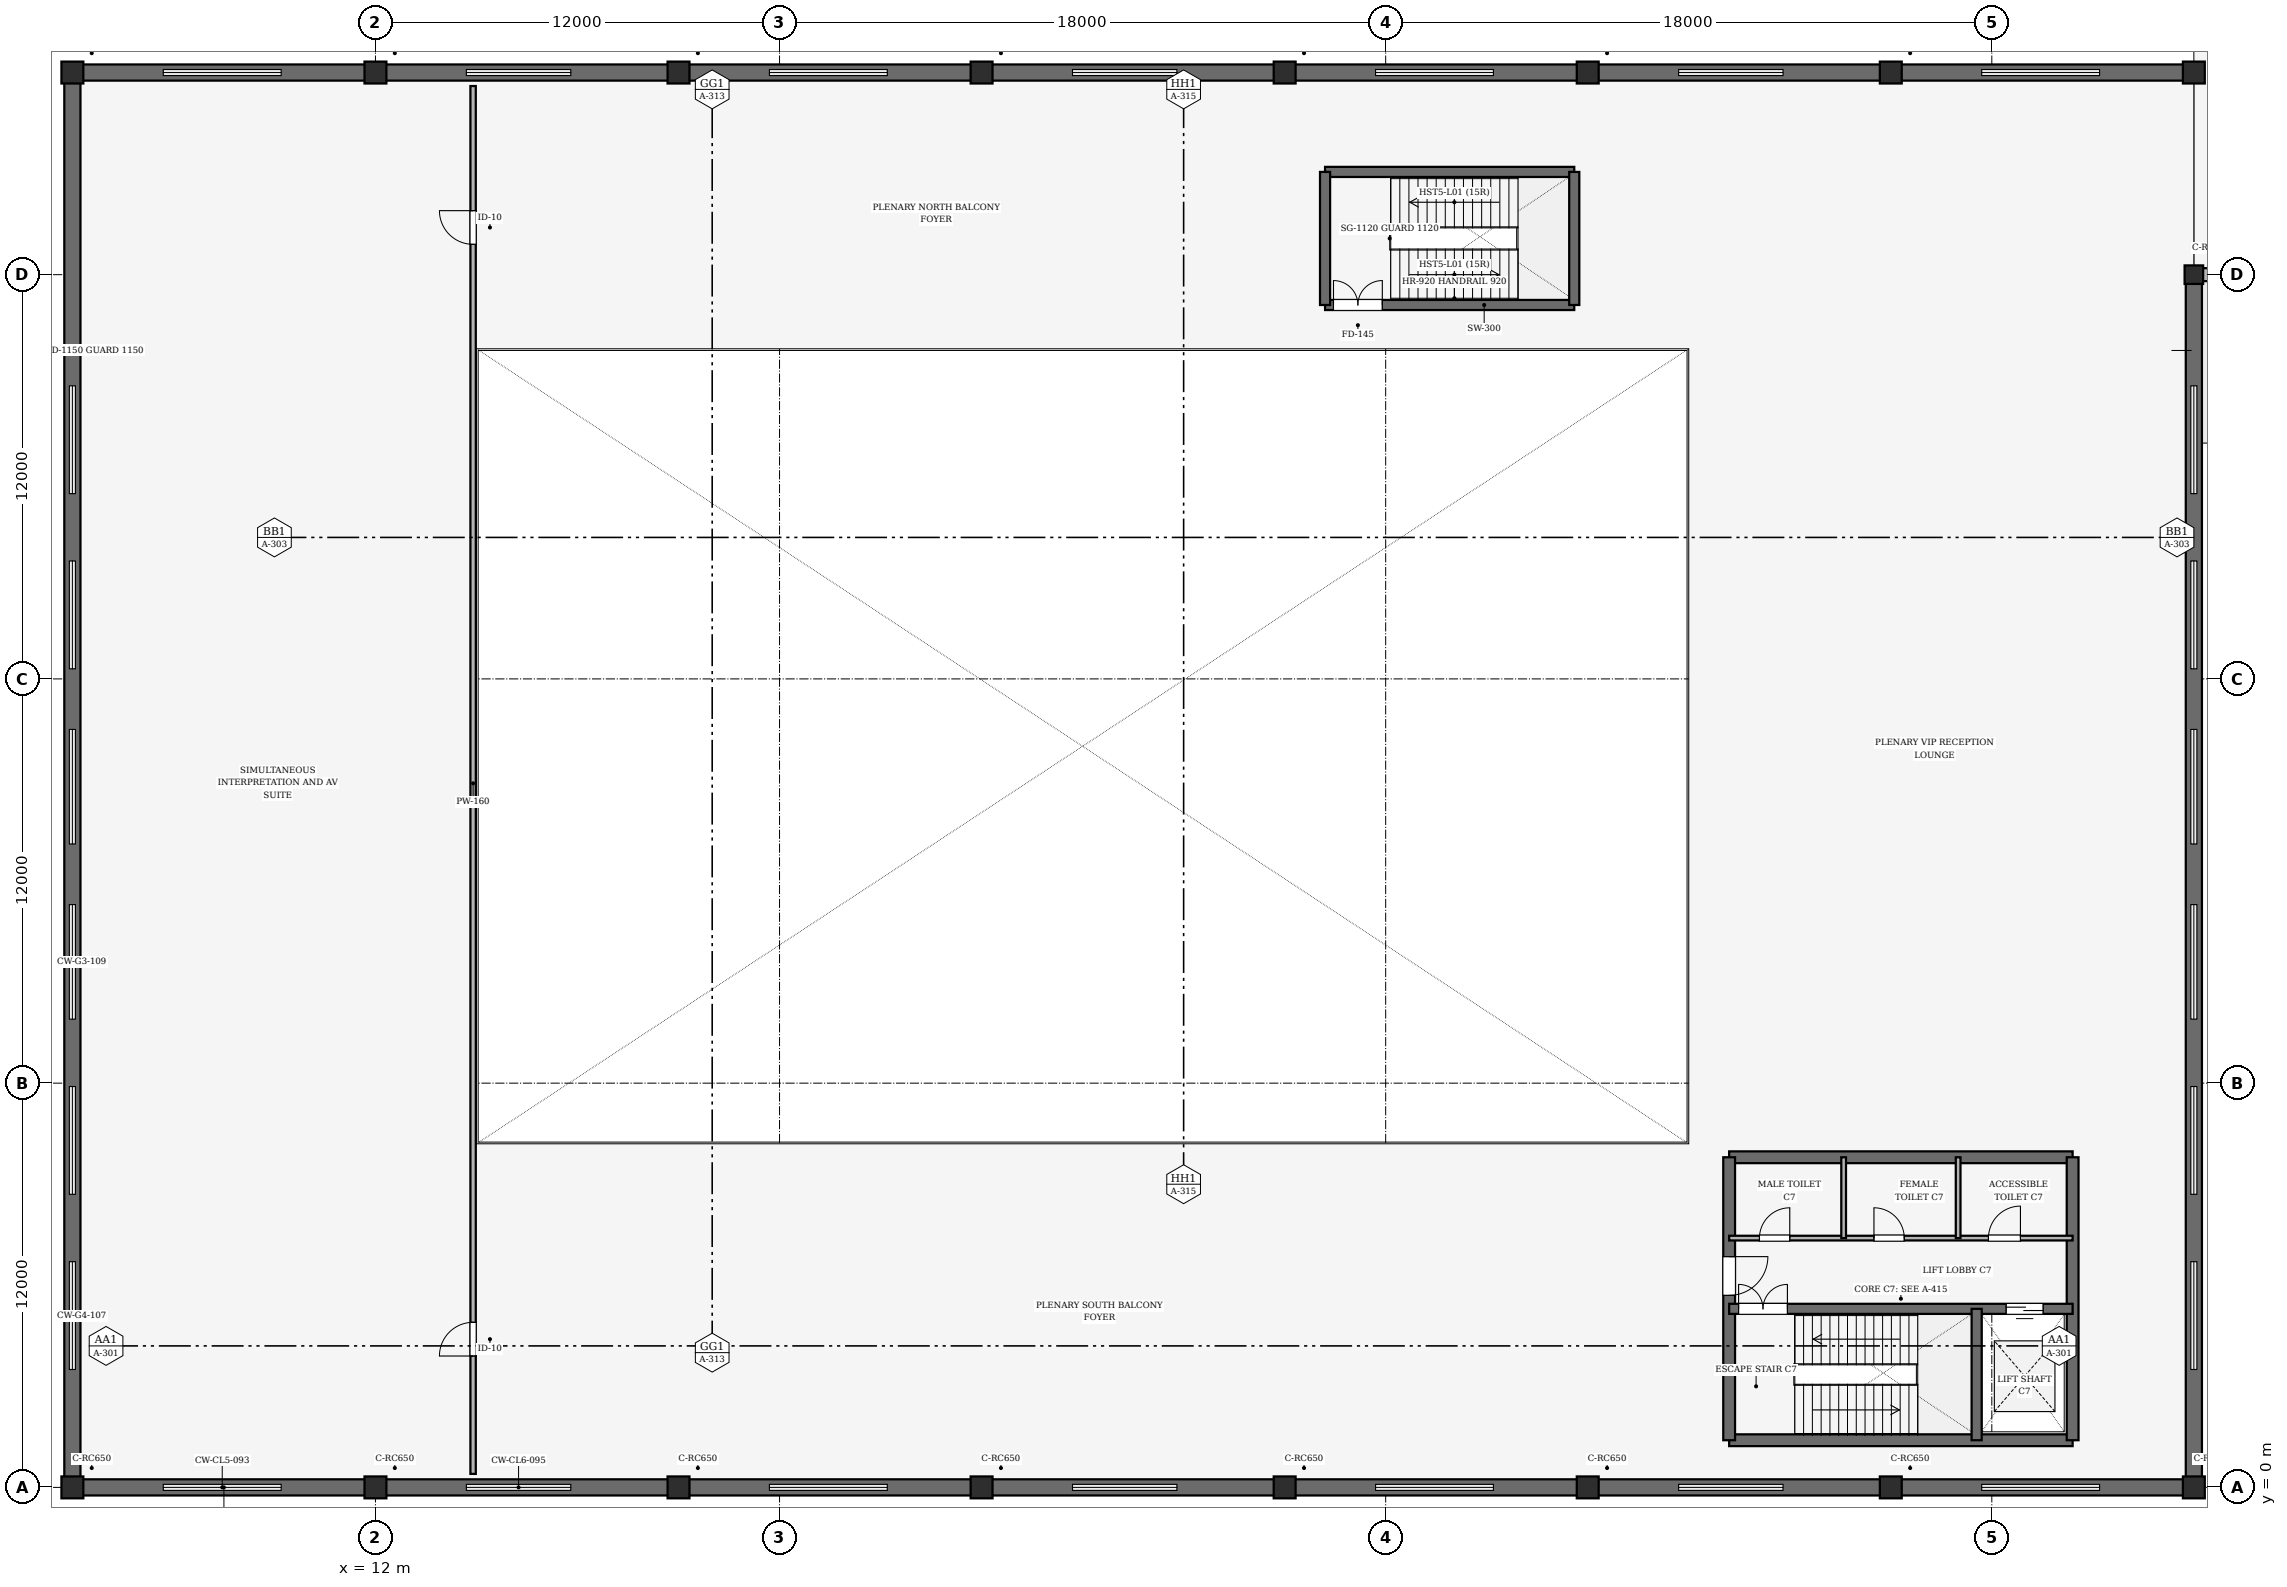
"""IFC4 building model, lengths in metres.
Left out: names, types, materials, properties, quantities, classifications, styles, units other than length and angle.
Written with IfcOpenShell. Run it as: python <this file> out.ifc"""

import sys

from ifc_helpers import new_model, si_unit, direction, frame, frame_2d, origin, origin_2d, place, context, subcontext, project, spatial, rectangle, extrude, element, fill, save


model = new_model("IFC4")
c1 = context("Model", 3, precision=1e-05, world=origin(), true_north=direction((0.0, 1.0)))
c2 = subcontext(c1, "Body", "Model", "MODEL_VIEW")
j1 = project(units=[si_unit("LENGTHUNIT", "METRE"), si_unit("PLANEANGLEUNIT", "RADIAN")], contexts=[c1])
p1 = place(None, origin())
s1 = spatial("IfcSite", under=j1, at=p1, CompositionType="ELEMENT")
p2 = place(p1, origin())
s2 = spatial("IfcBuilding", under=s1, at=p2, CompositionType="ELEMENT")
p3 = place(p2, frame((0.0, 0.0, 5.4)))
s3 = spatial("IfcBuildingStorey", under=s2, at=p3, CompositionType="ELEMENT", Elevation=5.4)
for number, where, z_axis, x_axis in (
    (1, (3.0, 0.0, 0.0), (0.0, 0.0, 1.0), (1.0, 0.0, 0.0)),
    (2, (3.0, 42.0, 0.0), (0.0, 0.0, 1.0), (1.0, 0.0, 0.0)),
    (3, (12.0, 0.0, 0.0), (0.0, 0.0, 1.0), (1.0, 0.0, 0.0)),
    (4, (12.0, 42.0, 0.0), (0.0, 0.0, 1.0), (1.0, 0.0, 0.0)),
    (5, (21.0, 0.0, 0.0), (0.0, 0.0, 1.0), (1.0, 0.0, 0.0)),
    (6, (21.0, 42.0, 0.0), (0.0, 0.0, 1.0), (1.0, 0.0, 0.0)),
    (7, (30.0, 0.0, 0.0), (0.0, 0.0, 1.0), (1.0, 0.0, 0.0)),
    (8, (30.0, 42.0, 0.0), (0.0, 0.0, 1.0), (1.0, 0.0, 0.0)),
):
    element("IfcColumn", number, at=place(p3, frame(where, z_axis=z_axis, x_axis=x_axis)), inside=s3, PredefinedType="COLUMN", context=c2, shape_type="SweptSolid", body=[
        extrude(rectangle(XDim=0.65, YDim=0.65, at=origin_2d()), origin(), (0.0, 0.0, 1.0), 6.3),
    ])
for number, where, z_axis, x_axis in (
    (9, (39.0, 0.0, 0.0), (0.0, 0.0, 1.0), (1.0, 0.0, 0.0)),
    (10, (39.0, 42.0, 0.0), (0.0, 0.0, 1.0), (1.0, 0.0, 0.0)),
    (11, (48.0, 0.0, 0.0), (0.0, 0.0, 1.0), (1.0, 0.0, 0.0)),
    (12, (48.0, 42.0, 0.0), (0.0, 0.0, 1.0), (1.0, 0.0, 0.0)),
    (13, (57.0, 0.0, 0.0), (0.0, 0.0, 1.0), (1.0, 0.0, 0.0)),
    (14, (57.0, 42.0, 0.0), (0.0, 0.0, 1.0), (1.0, 0.0, 0.0)),
    (15, (66.0, 0.0, 0.0), (0.0, 0.0, 1.0), (1.0, 0.0, 0.0)),
    (16, (66.0, 42.0, 0.0), (0.0, 0.0, 1.0), (1.0, 0.0, 0.0)),
):
    element("IfcColumn", number, at=place(p3, frame(where, z_axis=z_axis, x_axis=x_axis)), inside=s3, PredefinedType="COLUMN", context=c2, shape_type="SweptSolid", body=[
        extrude(rectangle(XDim=0.65, YDim=0.65, at=origin_2d()), origin(), (0.0, 0.0, 1.0), 5.4),
    ])
p4 = place(p3, frame((66.0, 36.0, 0.0), z_axis=(0.0, 0.0, 1.0), x_axis=(1.0, 0.0, 0.0)))
e17 = element("IfcColumn", 17, at=p4, inside=s3, PredefinedType="COLUMN", context=c2, shape_type="SweptSolid", body=[
    extrude(rectangle(XDim=0.55, YDim=0.55, at=origin_2d()), origin(), (0.0, 0.0, 1.0), 5.4),
])
for number, where, z_axis, x_axis in (
    (18, (3.0, 0.0, 0.0), (0.0, 0.0, 1.0), (1.0, 0.0, 0.0)),
    (19, (12.0, 42.0, 0.0), (0.0, 0.0, 1.0), (-1.0, 0.0, 0.0)),
    (20, (12.0, 0.0, 0.0), (0.0, 0.0, 1.0), (1.0, 0.0, 0.0)),
    (21, (21.0, 42.0, 0.0), (0.0, 0.0, 1.0), (-1.0, 0.0, 0.0)),
    (22, (21.0, 0.0, 0.0), (0.0, 0.0, 1.0), (1.0, 0.0, 0.0)),
    (23, (30.0, 42.0, 0.0), (0.0, 0.0, 1.0), (-1.0, 0.0, 0.0)),
    (24, (30.0, 0.0, 0.0), (0.0, 0.0, 1.0), (1.0, 0.0, 0.0)),
    (25, (39.0, 42.0, 0.0), (0.0, 0.0, 1.0), (-1.0, 0.0, 0.0)),
    (26, (39.0, 0.0, 0.0), (0.0, 0.0, 1.0), (1.0, 0.0, 0.0)),
    (27, (48.0, 42.0, 0.0), (0.0, 0.0, 1.0), (-1.0, 0.0, 0.0)),
    (28, (48.0, 0.0, 0.0), (0.0, 0.0, 1.0), (1.0, 0.0, 0.0)),
    (29, (57.0, 42.0, 0.0), (0.0, 0.0, 1.0), (-1.0, 0.0, 0.0)),
    (30, (57.0, 0.0, 0.0), (0.0, 0.0, 1.0), (1.0, 0.0, 0.0)),
    (31, (66.0, 42.0, 0.0), (0.0, 0.0, 1.0), (-1.0, 0.0, 0.0)),
):
    element("IfcWall", number, at=place(p3, frame(where, z_axis=z_axis, x_axis=x_axis)), inside=s3, PredefinedType="SOLIDWALL", context=c2, shape_type="SweptSolid", body=[
        extrude(rectangle(XDim=9.0, YDim=0.48, at=frame_2d((4.5, 0.0))), origin(), (0.0, 0.0, 1.0), 1.85),
    ])
p5 = place(p3, frame((3.0, 42.0, 0.0), z_axis=(0.0, 0.0, 1.0), x_axis=(0.0, -1.0, 0.0)))
e32 = element("IfcWall", 32, at=p5, inside=s3, PredefinedType="SOLIDWALL", context=c2, shape_type="SweptSolid", body=[
    extrude(rectangle(XDim=42.0, YDim=0.48, at=frame_2d((21.0, 0.0))), origin(), (0.0, 0.0, 1.0), 0.95),
])
p6 = place(p3, frame((66.0, 0.0, 0.0), z_axis=(0.0, 0.0, 1.0), x_axis=(0.0, 1.0, 0.0)))
e33 = element("IfcWall", 33, at=p6, inside=s3, PredefinedType="SOLIDWALL", context=c2, shape_type="SweptSolid", body=[
    extrude(rectangle(XDim=36.0, YDim=0.48, at=frame_2d((18.0, 0.0))), origin(), (0.0, 0.0, 1.0), 0.95),
])
p7 = place(p3, frame((66.0, 36.0, 0.0), z_axis=(0.0, 0.0, 1.0), x_axis=(1.0, 0.0, 0.0)))
e34 = element("IfcWall", 34, at=p7, inside=s3, PredefinedType="SOLIDWALL", context=c2, shape_type="SweptSolid", body=[
    extrude(rectangle(XDim=18.0, YDim=0.385, at=frame_2d((9.0, 0.0))), origin(), (0.0, 0.0, 1.0), 0.6),
])
for number, where, z_axis, x_axis in (
    (35, (52.2, 1.4, 0.0), (0.0, 0.0, 1.0), (1.0, 0.0, 0.0)),
    (36, (62.4, 9.8, 0.0), (0.0, 0.0, 1.0), (-1.0, 0.0, 0.0)),
):
    element("IfcWall", number, at=place(p3, frame(where, z_axis=z_axis, x_axis=x_axis)), inside=s3, PredefinedType="SHEAR", context=c2, shape_type="SweptSolid", body=[
        extrude(rectangle(XDim=10.2, YDim=0.35, at=frame_2d((5.1, 0.0))), origin(), (0.0, 0.0, 1.0), 5.4),
    ])
p8 = place(p3, frame((52.2, 9.8, 0.0), z_axis=(0.0, 0.0, 1.0), x_axis=(0.0, -1.0, 0.0)))
e37 = element("IfcWall", 37, at=p8, inside=s3, PredefinedType="SHEAR", context=c2, shape_type="SweptSolid", body=[
    extrude(rectangle(XDim=8.4, YDim=0.35, at=frame_2d((4.2, 0.0))), origin(), (0.0, 0.0, 1.0), 5.4),
])
p9 = place(p8, frame((2.95, 0.0, 0.0)))
e38 = element("IfcOpeningElement", 38, at=p9, cuts=e37, PredefinedType="OPENING", context=c2, shape_type="SweptSolid", body=[
    extrude(rectangle(XDim=1.15, YDim=2.15, at=frame_2d((0.575, 1.075))), frame((0.0, 0.185, 0.0), z_axis=(0.0, -1.0, 0.0), x_axis=(1.0, 0.0, 0.0)), (0.0, 0.0, 1.0), 0.37),
])
p10 = place(p3, frame((62.4, 1.4, 0.0), z_axis=(0.0, 0.0, 1.0), x_axis=(0.0, 1.0, 0.0)))
e39 = element("IfcWall", 39, at=p10, inside=s3, PredefinedType="SHEAR", context=c2, shape_type="SweptSolid", body=[
    extrude(rectangle(XDim=8.4, YDim=0.35, at=frame_2d((4.2, 0.0))), origin(), (0.0, 0.0, 1.0), 5.4),
])
p11 = place(p3, frame((52.2, 5.3, 0.0), z_axis=(0.0, 0.0, 1.0), x_axis=(1.0, 0.0, 0.0)))
e40 = element("IfcWall", 40, at=p11, inside=s3, PredefinedType="SHEAR", context=c2, shape_type="SweptSolid", body=[
    extrude(rectangle(XDim=10.2, YDim=0.3, at=frame_2d((5.1, 0.0))), origin(), (0.0, 0.0, 1.0), 5.4),
])
p12 = place(p11, frame((0.28, 0.0, 0.0)))
e41 = element("IfcOpeningElement", 41, at=p12, cuts=e40, PredefinedType="OPENING", context=c2, shape_type="SweptSolid", body=[
    extrude(rectangle(XDim=1.45, YDim=2.15, at=frame_2d((0.725, 1.075))), frame((0.0, 0.16, 0.0), z_axis=(0.0, -1.0, 0.0), x_axis=(1.0, 0.0, 0.0)), (0.0, 0.0, 1.0), 0.32),
])
p13 = place(p11, frame((8.225, 0.0, 0.0)))
e42 = element("IfcOpeningElement", 42, at=p13, cuts=e40, PredefinedType="OPENING", context=c2, shape_type="SweptSolid", body=[
    extrude(rectangle(XDim=1.1, YDim=2.15, at=frame_2d((0.55, 1.075))), frame((0.0, 0.16, 0.0), z_axis=(0.0, -1.0, 0.0), x_axis=(1.0, 0.0, 0.0)), (0.0, 0.0, 1.0), 0.32),
])
p14 = place(p3, frame((59.55, 1.4, 0.0), z_axis=(0.0, 0.0, 1.0), x_axis=(0.0, 1.0, 0.0)))
e43 = element("IfcWall", 43, at=p14, inside=s3, PredefinedType="SHEAR", context=c2, shape_type="SweptSolid", body=[
    extrude(rectangle(XDim=3.9, YDim=0.3, at=frame_2d((1.95, 0.0))), origin(), (0.0, 0.0, 1.0), 5.4),
])
p15 = place(p3, frame((52.2, 7.4, 0.0), z_axis=(0.0, 0.0, 1.0), x_axis=(1.0, 0.0, 0.0)))
e44 = element("IfcWall", 44, at=p15, inside=s3, PredefinedType="PARTITIONING", context=c2, shape_type="SweptSolid", body=[
    extrude(rectangle(XDim=10.2, YDim=0.14, at=frame_2d((5.1, 0.0))), origin(), (0.0, 0.0, 1.0), 3.725),
])
p16 = place(p15, frame((0.9, 0.0, 0.0)))
e45 = element("IfcOpeningElement", 45, at=p16, cuts=e44, PredefinedType="OPENING", context=c2, shape_type="SweptSolid", body=[
    extrude(rectangle(XDim=0.9, YDim=2.1, at=frame_2d((0.45, 1.05))), frame((0.0, 0.08, 0.0), z_axis=(0.0, -1.0, 0.0), x_axis=(1.0, 0.0, 0.0)), (0.0, 0.0, 1.0), 0.16),
])
p17 = place(p15, frame((4.3, 0.0, 0.0)))
e46 = element("IfcOpeningElement", 46, at=p17, cuts=e44, PredefinedType="OPENING", context=c2, shape_type="SweptSolid", body=[
    extrude(rectangle(XDim=0.9, YDim=2.1, at=frame_2d((0.45, 1.05))), frame((0.0, 0.08, 0.0), z_axis=(0.0, -1.0, 0.0), x_axis=(1.0, 0.0, 0.0)), (0.0, 0.0, 1.0), 0.16),
])
p18 = place(p15, frame((7.7, 0.0, 0.0)))
e47 = element("IfcOpeningElement", 47, at=p18, cuts=e44, PredefinedType="OPENING", context=c2, shape_type="SweptSolid", body=[
    extrude(rectangle(XDim=0.95, YDim=2.1, at=frame_2d((0.475, 1.05))), frame((0.0, 0.08, 0.0), z_axis=(0.0, -1.0, 0.0), x_axis=(1.0, 0.0, 0.0)), (0.0, 0.0, 1.0), 0.16),
])
for number, where, z_axis, x_axis in (
    (48, (55.6, 7.4, 0.0), (0.0, 0.0, 1.0), (0.0, 1.0, 0.0)),
    (49, (59.0, 7.4, 0.0), (0.0, 0.0, 1.0), (0.0, 1.0, 0.0)),
):
    element("IfcWall", number, at=place(p3, frame(where, z_axis=z_axis, x_axis=x_axis)), inside=s3, PredefinedType="PARTITIONING", context=c2, shape_type="SweptSolid", body=[
        extrude(rectangle(XDim=2.4, YDim=0.14, at=frame_2d((1.2, 0.0))), origin(), (0.0, 0.0, 1.0), 4.5),
    ])
p19 = place(p3, frame((40.2, 35.1, 0.0), z_axis=(0.0, 0.0, 1.0), x_axis=(1.0, 0.0, 0.0)))
e50 = element("IfcWall", 50, at=p19, inside=s3, PredefinedType="SHEAR", context=c2, shape_type="SweptSolid", body=[
    extrude(rectangle(XDim=7.4, YDim=0.3, at=frame_2d((3.7, 0.0))), origin(), (0.0, 0.0, 1.0), 5.4),
])
p20 = place(p19, frame((0.25, 0.0, 0.0)))
e51 = element("IfcOpeningElement", 51, at=p20, cuts=e50, PredefinedType="OPENING", context=c2, shape_type="SweptSolid", body=[
    extrude(rectangle(XDim=1.45, YDim=2.15, at=frame_2d((0.725, 1.075))), frame((0.0, 0.16, 0.0), z_axis=(0.0, -1.0, 0.0), x_axis=(1.0, 0.0, 0.0)), (0.0, 0.0, 1.0), 0.32),
])
p21 = place(p3, frame((47.6, 39.05, 0.0), z_axis=(0.0, 0.0, 1.0), x_axis=(-1.0, 0.0, 0.0)))
e52 = element("IfcWall", 52, at=p21, inside=s3, PredefinedType="SHEAR", context=c2, shape_type="SweptSolid", body=[
    extrude(rectangle(XDim=7.4, YDim=0.3, at=frame_2d((3.7, 0.0))), origin(), (0.0, 0.0, 1.0), 5.4),
])
for number, where, z_axis, x_axis in (
    (53, (40.2, 39.05, 0.0), (0.0, 0.0, 1.0), (0.0, -1.0, 0.0)),
    (54, (47.6, 35.1, 0.0), (0.0, 0.0, 1.0), (0.0, 1.0, 0.0)),
):
    element("IfcWall", number, at=place(p3, frame(where, z_axis=z_axis, x_axis=x_axis)), inside=s3, PredefinedType="SHEAR", context=c2, shape_type="SweptSolid", body=[
        extrude(rectangle(XDim=3.95, YDim=0.3, at=frame_2d((1.975, 0.0))), origin(), (0.0, 0.0, 1.0), 5.4),
    ])
p22 = place(p3, frame((14.9, 0.4, 0.0), z_axis=(0.0, 0.0, 1.0), x_axis=(0.0, 1.0, 0.0)))
e55 = element("IfcWall", 55, at=p22, inside=s3, PredefinedType="PARTITIONING", context=c2, shape_type="SweptSolid", body=[
    extrude(rectangle(XDim=41.2, YDim=0.16, at=frame_2d((20.6, 0.0))), origin(), (0.0, 0.0, 1.0), 4.05),
])
p23 = place(p22, frame((3.5, 0.0, 0.0)))
e56 = element("IfcOpeningElement", 56, at=p23, cuts=e55, PredefinedType="OPENING", context=c2, shape_type="SweptSolid", body=[
    extrude(rectangle(XDim=1.0, YDim=2.15, at=frame_2d((0.5, 1.075))), frame((0.0, 0.09, 0.0), z_axis=(0.0, -1.0, 0.0), x_axis=(1.0, 0.0, 0.0)), (0.0, 0.0, 1.0), 0.18),
])
p24 = place(p22, frame((36.5, 0.0, 0.0)))
e57 = element("IfcOpeningElement", 57, at=p24, cuts=e55, PredefinedType="OPENING", context=c2, shape_type="SweptSolid", body=[
    extrude(rectangle(XDim=1.0, YDim=2.15, at=frame_2d((0.5, 1.075))), frame((0.0, 0.09, 0.0), z_axis=(0.0, -1.0, 0.0), x_axis=(1.0, 0.0, 0.0)), (0.0, 0.0, 1.0), 0.18),
])
p25 = place(p9, origin())
e58 = element("IfcDoor", 58, at=p25, inside=s3, OperationType="SINGLE_SWING_LEFT", PredefinedType="DOOR", context=c2, shape_type="SweptSolid", body=[
    extrude(rectangle(XDim=1.15, YDim=2.15, at=frame_2d((0.575, 1.075))), frame((0.0, 0.025, 0.0), z_axis=(0.0, -1.0, 0.0), x_axis=(1.0, 0.0, 0.0)), (0.0, 0.0, 1.0), 0.05),
])
fill(e38, e58)
p26 = place(p12, origin())
e59 = element("IfcDoor", 59, at=p26, inside=s3, OperationType="DOUBLE_DOOR_SINGLE_SWING", PredefinedType="DOOR", context=c2, shape_type="SweptSolid", body=[
    extrude(rectangle(XDim=1.45, YDim=2.15, at=frame_2d((0.725, 1.075))), frame((0.0, 0.025, 0.0), z_axis=(0.0, -1.0, 0.0), x_axis=(1.0, 0.0, 0.0)), (0.0, 0.0, 1.0), 0.05),
])
fill(e41, e59)
p27 = place(p13, origin())
e60 = element("IfcDoor", 60, at=p27, inside=s3, OperationType="DOUBLE_DOOR_SLIDING", PredefinedType="DOOR", context=c2, shape_type="SweptSolid", body=[
    extrude(rectangle(XDim=1.1, YDim=2.15, at=frame_2d((0.55, 1.075))), frame((0.0, 0.025, 0.0), z_axis=(0.0, -1.0, 0.0), x_axis=(1.0, 0.0, 0.0)), (0.0, 0.0, 1.0), 0.05),
])
fill(e42, e60)
p28 = place(p16, origin())
e61 = element("IfcDoor", 61, at=p28, inside=s3, OperationType="SINGLE_SWING_RIGHT", PredefinedType="DOOR", context=c2, shape_type="SweptSolid", body=[
    extrude(rectangle(XDim=0.9, YDim=2.1, at=frame_2d((0.45, 1.05))), frame((0.0, 0.025, 0.0), z_axis=(0.0, -1.0, 0.0), x_axis=(1.0, 0.0, 0.0)), (0.0, 0.0, 1.0), 0.05),
])
fill(e45, e61)
p29 = place(p17, origin())
e62 = element("IfcDoor", 62, at=p29, inside=s3, OperationType="SINGLE_SWING_LEFT", PredefinedType="DOOR", context=c2, shape_type="SweptSolid", body=[
    extrude(rectangle(XDim=0.9, YDim=2.1, at=frame_2d((0.45, 1.05))), frame((0.0, 0.025, 0.0), z_axis=(0.0, -1.0, 0.0), x_axis=(1.0, 0.0, 0.0)), (0.0, 0.0, 1.0), 0.05),
])
fill(e46, e62)
p30 = place(p18, origin())
e63 = element("IfcDoor", 63, at=p30, inside=s3, OperationType="SINGLE_SWING_RIGHT", PredefinedType="DOOR", context=c2, shape_type="SweptSolid", body=[
    extrude(rectangle(XDim=0.95, YDim=2.1, at=frame_2d((0.475, 1.05))), frame((0.0, 0.025, 0.0), z_axis=(0.0, -1.0, 0.0), x_axis=(1.0, 0.0, 0.0)), (0.0, 0.0, 1.0), 0.05),
])
fill(e47, e63)
p31 = place(p20, origin())
e64 = element("IfcDoor", 64, at=p31, inside=s3, OperationType="DOUBLE_DOOR_SINGLE_SWING", PredefinedType="DOOR", context=c2, shape_type="SweptSolid", body=[
    extrude(rectangle(XDim=1.45, YDim=2.15, at=frame_2d((0.725, 1.075))), frame((0.0, 0.025, 0.0), z_axis=(0.0, -1.0, 0.0), x_axis=(1.0, 0.0, 0.0)), (0.0, 0.0, 1.0), 0.05),
])
fill(e51, e64)
p32 = place(p23, origin())
e65 = element("IfcDoor", 65, at=p32, inside=s3, OperationType="SINGLE_SWING_LEFT", PredefinedType="DOOR", context=c2, shape_type="SweptSolid", body=[
    extrude(rectangle(XDim=1.0, YDim=2.15, at=frame_2d((0.5, 1.075))), frame((0.0, 0.025, 0.0), z_axis=(0.0, -1.0, 0.0), x_axis=(1.0, 0.0, 0.0)), (0.0, 0.0, 1.0), 0.05),
])
fill(e56, e65)
p33 = place(p24, origin())
e66 = element("IfcDoor", 66, at=p33, inside=s3, OperationType="SINGLE_SWING_RIGHT", PredefinedType="DOOR", context=c2, shape_type="SweptSolid", body=[
    extrude(rectangle(XDim=1.0, YDim=2.15, at=frame_2d((0.5, 1.075))), frame((0.0, 0.025, 0.0), z_axis=(0.0, -1.0, 0.0), x_axis=(1.0, 0.0, 0.0)), (0.0, 0.0, 1.0), 0.05),
])
fill(e57, e66)
save(model, sys.argv[1])
